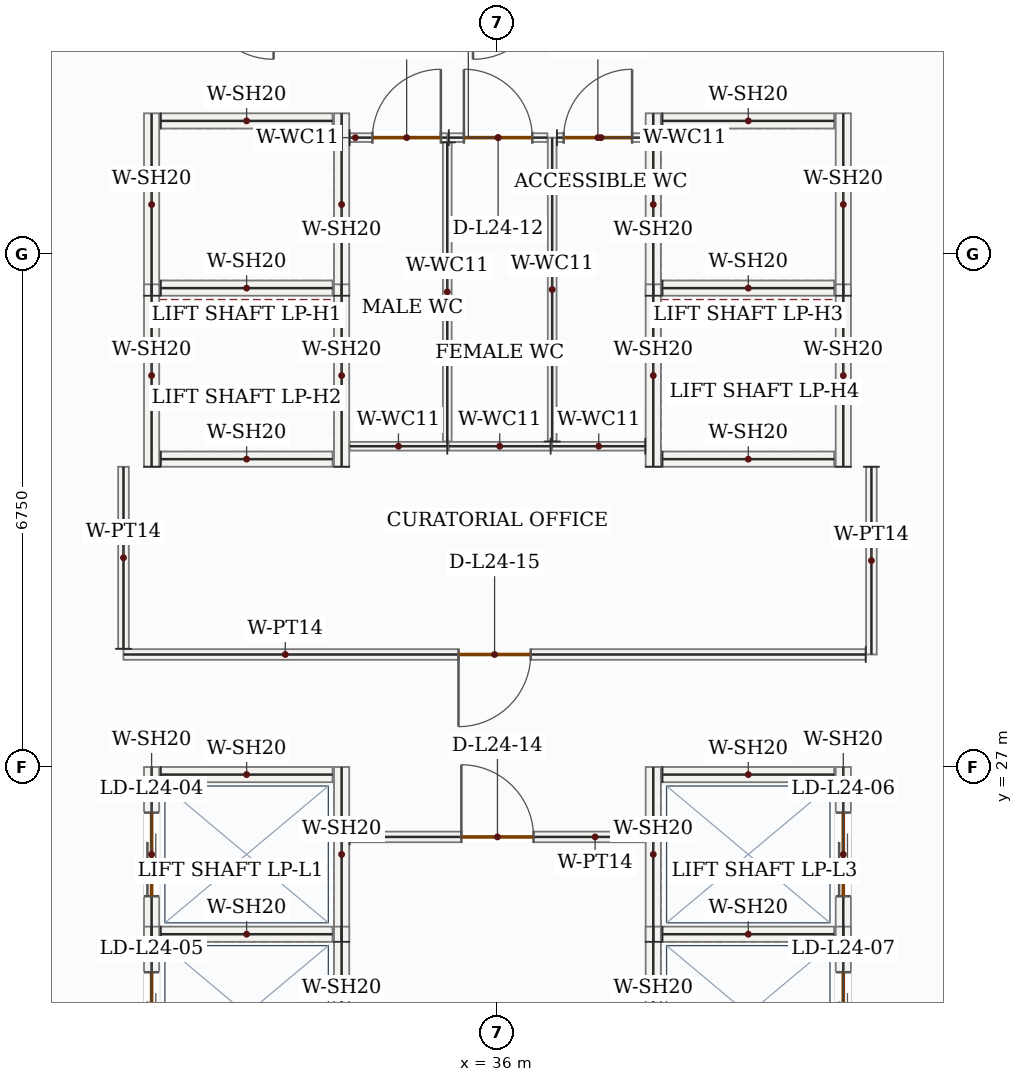
"""IFC4 building model, lengths in metres.
Left out: names, types, materials, properties, quantities, classifications, styles, units other than length and angle.
Written with IfcOpenShell. Run it as: python <this file> out.ifc"""

import sys

from ifc_helpers import new_model, si_unit, direction, frame, frame_2d, origin, place, context, subcontext, project, spatial, rectangle, extrude, source, transform, mapped, element, fill, save


model = new_model("IFC4")
c1 = context("Model", 3, precision=1e-05, world=origin(), true_north=direction((0.0, 1.0)))
c2 = subcontext(c1, "Body", "Model", "MODEL_VIEW")
j1 = project(units=[si_unit("LENGTHUNIT", "METRE"), si_unit("PLANEANGLEUNIT", "RADIAN")], contexts=[c1])
p1 = place(None, origin())
s1 = spatial("IfcSite", under=j1, at=p1, CompositionType="ELEMENT")
p2 = place(p1, origin())
s2 = spatial("IfcBuilding", under=s1, at=p2, CompositionType="ELEMENT")
p3 = place(p2, frame((0.0, 0.0, 108.9)))
s3 = spatial("IfcBuildingStorey", under=s2, at=p3, CompositionType="ELEMENT", Elevation=108.9)
m1 = source(origin(), c2, "Body", "SweptSolid", [
    extrude(rectangle(XDim=2.4, YDim=0.2, at=frame_2d((1.2, 0.0))), origin(), (0.0, 0.0, 1.0), 3.95),
])
for number, where, z_axis, x_axis in (
    (1, (31.45, 33.2, 0.0), (0.0, 0.0, 1.0), (0.0, 1.0, 0.0)),
    (2, (33.95, 33.2, 0.0), (0.0, 0.0, 1.0), (0.0, 1.0, 0.0)),
):
    element("IfcWall", number, at=place(p3, frame(where, z_axis=z_axis, x_axis=x_axis)), inside=s3, PredefinedType="SOLIDWALL", context=c2, shape_type="MappedRepresentation", body=[
        mapped(m1, transform((0.0, 0.0, 0.0), x_axis=(1.0, 0.0, 0.0), y_axis=(0.0, 1.0, 0.0), z_axis=(0.0, 0.0, 1.0), scale=1.0)),
    ])
m2 = source(origin(), c2, "Body", "SweptSolid", [
    extrude(rectangle(XDim=2.26, YDim=0.2, at=frame_2d((1.13, 0.0))), origin(), (0.0, 0.0, 1.0), 3.95),
])
for number, where, z_axis, x_axis in (
    (3, (31.57, 33.3, 0.0), (0.0, 0.0, 1.0), (1.0, 0.0, 0.0)),
    (4, (31.57, 35.5, 0.0), (0.0, 0.0, 1.0), (1.0, 0.0, 0.0)),
):
    element("IfcWall", number, at=place(p3, frame(where, z_axis=z_axis, x_axis=x_axis)), inside=s3, PredefinedType="SOLIDWALL", context=c2, shape_type="MappedRepresentation", body=[
        mapped(m2, transform((0.0, 0.0, 0.0), x_axis=(1.0, 0.0, 0.0), y_axis=(0.0, 1.0, 0.0), z_axis=(0.0, 0.0, 1.0), scale=1.0)),
    ])
for number, where, z_axis, x_axis in (
    (5, (31.45, 30.95, 0.0), (0.0, 0.0, 1.0), (0.0, 1.0, 0.0)),
    (6, (33.95, 30.95, 0.0), (0.0, 0.0, 1.0), (0.0, 1.0, 0.0)),
):
    element("IfcWall", number, at=place(p3, frame(where, z_axis=z_axis, x_axis=x_axis)), inside=s3, PredefinedType="SOLIDWALL", context=c2, shape_type="MappedRepresentation", body=[
        mapped(m1, transform((0.0, 0.0, 0.0), x_axis=(1.0, 0.0, 0.0), y_axis=(0.0, 1.0, 0.0), z_axis=(0.0, 0.0, 1.0), scale=1.0)),
    ])
p4 = place(p3, frame((31.57, 31.05, 0.0), z_axis=(0.0, 0.0, 1.0), x_axis=(1.0, 0.0, 0.0)))
e7 = element("IfcWall", 7, at=p4, inside=s3, PredefinedType="SOLIDWALL", context=c2, shape_type="MappedRepresentation", body=[
    mapped(m2, transform((0.0, 0.0, 0.0), x_axis=(1.0, 0.0, 0.0), y_axis=(0.0, 1.0, 0.0), z_axis=(0.0, 0.0, 1.0), scale=1.0)),
])
for number, where, z_axis, x_axis in (
    (8, (38.05, 33.2, 0.0), (0.0, 0.0, 1.0), (0.0, 1.0, 0.0)),
    (9, (40.55, 33.2, 0.0), (0.0, 0.0, 1.0), (0.0, 1.0, 0.0)),
):
    element("IfcWall", number, at=place(p3, frame(where, z_axis=z_axis, x_axis=x_axis)), inside=s3, PredefinedType="SOLIDWALL", context=c2, shape_type="MappedRepresentation", body=[
        mapped(m1, transform((0.0, 0.0, 0.0), x_axis=(1.0, 0.0, 0.0), y_axis=(0.0, 1.0, 0.0), z_axis=(0.0, 0.0, 1.0), scale=1.0)),
    ])
for number, where, z_axis, x_axis in (
    (10, (38.17, 33.3, 0.0), (0.0, 0.0, 1.0), (1.0, 0.0, 0.0)),
    (11, (38.17, 35.5, 0.0), (0.0, 0.0, 1.0), (1.0, 0.0, 0.0)),
):
    element("IfcWall", number, at=place(p3, frame(where, z_axis=z_axis, x_axis=x_axis)), inside=s3, PredefinedType="SOLIDWALL", context=c2, shape_type="MappedRepresentation", body=[
        mapped(m2, transform((0.0, 0.0, 0.0), x_axis=(1.0, 0.0, 0.0), y_axis=(0.0, 1.0, 0.0), z_axis=(0.0, 0.0, 1.0), scale=1.0)),
    ])
for number, where, z_axis, x_axis in (
    (12, (38.05, 30.95, 0.0), (0.0, 0.0, 1.0), (0.0, 1.0, 0.0)),
    (13, (40.55, 30.95, 0.0), (0.0, 0.0, 1.0), (0.0, 1.0, 0.0)),
):
    element("IfcWall", number, at=place(p3, frame(where, z_axis=z_axis, x_axis=x_axis)), inside=s3, PredefinedType="SOLIDWALL", context=c2, shape_type="MappedRepresentation", body=[
        mapped(m1, transform((0.0, 0.0, 0.0), x_axis=(1.0, 0.0, 0.0), y_axis=(0.0, 1.0, 0.0), z_axis=(0.0, 0.0, 1.0), scale=1.0)),
    ])
p5 = place(p3, frame((38.17, 31.05, 0.0), z_axis=(0.0, 0.0, 1.0), x_axis=(1.0, 0.0, 0.0)))
e14 = element("IfcWall", 14, at=p5, inside=s3, PredefinedType="SOLIDWALL", context=c2, shape_type="MappedRepresentation", body=[
    mapped(m2, transform((0.0, 0.0, 0.0), x_axis=(1.0, 0.0, 0.0), y_axis=(0.0, 1.0, 0.0), z_axis=(0.0, 0.0, 1.0), scale=1.0)),
])
p6 = place(p3, frame((31.45, 24.7, 0.0), z_axis=(0.0, 0.0, 1.0), x_axis=(0.0, 1.0, 0.0)))
e15 = element("IfcWall", 15, at=p6, inside=s3, PredefinedType="SOLIDWALL", context=c2, shape_type="SweptSolid", body=[
    extrude(rectangle(XDim=2.3, YDim=0.2, at=frame_2d((1.15, 0.0))), origin(), (0.0, 0.0, 1.0), 3.95),
])
p7 = place(p6, frame((0.6, 0.0, 0.0)))
e16 = element("IfcOpeningElement", 16, at=p7, cuts=e15, PredefinedType="OPENING", context=c2, shape_type="SweptSolid", body=[
    extrude(rectangle(XDim=1.1, YDim=2.15, at=frame_2d((0.55, 1.075))), frame((0.0, 0.11, 0.0), z_axis=(0.0, -1.0, 0.0), x_axis=(1.0, 0.0, 0.0)), (0.0, 0.0, 1.0), 0.22),
])
m3 = source(origin(), c2, "Body", "SweptSolid", [
    extrude(rectangle(XDim=2.3, YDim=0.2, at=frame_2d((1.15, 0.0))), origin(), (0.0, 0.0, 1.0), 3.95),
])
p8 = place(p3, frame((33.95, 24.7, 0.0), z_axis=(0.0, 0.0, 1.0), x_axis=(0.0, 1.0, 0.0)))
e17 = element("IfcWall", 17, at=p8, inside=s3, PredefinedType="SOLIDWALL", context=c2, shape_type="MappedRepresentation", body=[
    mapped(m3, transform((0.0, 0.0, 0.0), x_axis=(1.0, 0.0, 0.0), y_axis=(0.0, 1.0, 0.0), z_axis=(0.0, 0.0, 1.0), scale=1.0)),
])
for number, where, z_axis, x_axis in (
    (18, (31.57, 24.8, 0.0), (0.0, 0.0, 1.0), (1.0, 0.0, 0.0)),
    (19, (31.57, 26.9, 0.0), (0.0, 0.0, 1.0), (1.0, 0.0, 0.0)),
):
    element("IfcWall", number, at=place(p3, frame(where, z_axis=z_axis, x_axis=x_axis)), inside=s3, PredefinedType="SOLIDWALL", context=c2, shape_type="MappedRepresentation", body=[
        mapped(m2, transform((0.0, 0.0, 0.0), x_axis=(1.0, 0.0, 0.0), y_axis=(0.0, 1.0, 0.0), z_axis=(0.0, 0.0, 1.0), scale=1.0)),
    ])
p9 = place(p3, frame((31.45, 22.6, 0.0), z_axis=(0.0, 0.0, 1.0), x_axis=(0.0, 1.0, 0.0)))
e20 = element("IfcWall", 20, at=p9, inside=s3, PredefinedType="SOLIDWALL", context=c2, shape_type="SweptSolid", body=[
    extrude(rectangle(XDim=2.3, YDim=0.2, at=frame_2d((1.15, 0.0))), origin(), (0.0, 0.0, 1.0), 3.95),
])
p10 = place(p9, frame((0.6, 0.0, 0.0)))
e21 = element("IfcOpeningElement", 21, at=p10, cuts=e20, PredefinedType="OPENING", context=c2, shape_type="SweptSolid", body=[
    extrude(rectangle(XDim=1.1, YDim=2.15, at=frame_2d((0.55, 1.075))), frame((0.0, 0.11, 0.0), z_axis=(0.0, -1.0, 0.0), x_axis=(1.0, 0.0, 0.0)), (0.0, 0.0, 1.0), 0.22),
])
m4 = source(origin(), c2, "Body", "SweptSolid", [
    extrude(rectangle(XDim=2.3, YDim=0.2, at=frame_2d((1.15, 0.0))), origin(), (0.0, 0.0, 1.0), 3.95),
])
p11 = place(p3, frame((33.95, 22.6, 0.0), z_axis=(0.0, 0.0, 1.0), x_axis=(0.0, 1.0, 0.0)))
e22 = element("IfcWall", 22, at=p11, inside=s3, PredefinedType="SOLIDWALL", context=c2, shape_type="MappedRepresentation", body=[
    mapped(m4, transform((0.0, 0.0, 0.0), x_axis=(1.0, 0.0, 0.0), y_axis=(0.0, 1.0, 0.0), z_axis=(0.0, 0.0, 1.0), scale=1.0)),
])
p12 = place(p3, frame((38.05, 24.7, 0.0), z_axis=(0.0, 0.0, 1.0), x_axis=(0.0, 1.0, 0.0)))
e23 = element("IfcWall", 23, at=p12, inside=s3, PredefinedType="SOLIDWALL", context=c2, shape_type="MappedRepresentation", body=[
    mapped(m3, transform((0.0, 0.0, 0.0), x_axis=(1.0, 0.0, 0.0), y_axis=(0.0, 1.0, 0.0), z_axis=(0.0, 0.0, 1.0), scale=1.0)),
])
p13 = place(p3, frame((40.55, 24.7, 0.0), z_axis=(0.0, 0.0, 1.0), x_axis=(0.0, 1.0, 0.0)))
e24 = element("IfcWall", 24, at=p13, inside=s3, PredefinedType="SOLIDWALL", context=c2, shape_type="SweptSolid", body=[
    extrude(rectangle(XDim=2.3, YDim=0.2, at=frame_2d((1.15, 0.0))), origin(), (0.0, 0.0, 1.0), 3.95),
])
p14 = place(p13, frame((0.6, 0.0, 0.0)))
e25 = element("IfcOpeningElement", 25, at=p14, cuts=e24, PredefinedType="OPENING", context=c2, shape_type="SweptSolid", body=[
    extrude(rectangle(XDim=1.1, YDim=2.15, at=frame_2d((0.55, 1.075))), frame((0.0, 0.11, 0.0), z_axis=(0.0, -1.0, 0.0), x_axis=(1.0, 0.0, 0.0)), (0.0, 0.0, 1.0), 0.22),
])
for number, where, z_axis, x_axis in (
    (26, (38.17, 24.8, 0.0), (0.0, 0.0, 1.0), (1.0, 0.0, 0.0)),
    (27, (38.17, 26.9, 0.0), (0.0, 0.0, 1.0), (1.0, 0.0, 0.0)),
):
    element("IfcWall", number, at=place(p3, frame(where, z_axis=z_axis, x_axis=x_axis)), inside=s3, PredefinedType="SOLIDWALL", context=c2, shape_type="MappedRepresentation", body=[
        mapped(m2, transform((0.0, 0.0, 0.0), x_axis=(1.0, 0.0, 0.0), y_axis=(0.0, 1.0, 0.0), z_axis=(0.0, 0.0, 1.0), scale=1.0)),
    ])
p15 = place(p3, frame((38.05, 22.6, 0.0), z_axis=(0.0, 0.0, 1.0), x_axis=(0.0, 1.0, 0.0)))
e28 = element("IfcWall", 28, at=p15, inside=s3, PredefinedType="SOLIDWALL", context=c2, shape_type="MappedRepresentation", body=[
    mapped(m4, transform((0.0, 0.0, 0.0), x_axis=(1.0, 0.0, 0.0), y_axis=(0.0, 1.0, 0.0), z_axis=(0.0, 0.0, 1.0), scale=1.0)),
])
p16 = place(p3, frame((40.55, 22.6, 0.0), z_axis=(0.0, 0.0, 1.0), x_axis=(0.0, 1.0, 0.0)))
e29 = element("IfcWall", 29, at=p16, inside=s3, PredefinedType="SOLIDWALL", context=c2, shape_type="SweptSolid", body=[
    extrude(rectangle(XDim=2.3, YDim=0.2, at=frame_2d((1.15, 0.0))), origin(), (0.0, 0.0, 1.0), 3.95),
])
p17 = place(p16, frame((0.6, 0.0, 0.0)))
e30 = element("IfcOpeningElement", 30, at=p17, cuts=e29, PredefinedType="OPENING", context=c2, shape_type="SweptSolid", body=[
    extrude(rectangle(XDim=1.1, YDim=2.15, at=frame_2d((0.55, 1.075))), frame((0.0, 0.11, 0.0), z_axis=(0.0, -1.0, 0.0), x_axis=(1.0, 0.0, 0.0)), (0.0, 0.0, 1.0), 0.22),
])
m5 = source(origin(), c2, "Body", "SweptSolid", [
    extrude(rectangle(XDim=1.225, YDim=0.115, at=frame_2d((0.613, 0.0))), origin(), (0.0, 0.0, 1.0), 3.95),
])
p18 = place(p3, frame((37.945, 31.22, 0.0), z_axis=(0.0, 0.0, 1.0), x_axis=(-1.0, 0.0, 0.0)))
e31 = element("IfcWall", 31, at=p18, inside=s3, PredefinedType="PARTITIONING", context=c2, shape_type="MappedRepresentation", body=[
    mapped(m5, transform((0.0, 0.0, 0.0), x_axis=(1.0, 0.0, 0.0), y_axis=(0.0, 1.0, 0.0), z_axis=(0.0, 0.0, 1.0), scale=1.0)),
])
m6 = source(origin(), c2, "Body", "SweptSolid", [
    extrude(rectangle(XDim=3.998, YDim=0.115, at=frame_2d((1.999, 0.0))), origin(), (0.0, 0.0, 1.0), 3.95),
])
p19 = place(p3, frame((36.72, 31.282, 0.0), z_axis=(0.0, 0.0, 1.0), x_axis=(0.0, 1.0, 0.0)))
e32 = element("IfcWall", 32, at=p19, inside=s3, PredefinedType="PARTITIONING", context=c2, shape_type="MappedRepresentation", body=[
    mapped(m6, transform((0.0, 0.0, 0.0), x_axis=(1.0, 0.0, 0.0), y_axis=(0.0, 1.0, 0.0), z_axis=(0.0, 0.0, 1.0), scale=1.0)),
])
p20 = place(p3, frame((36.782, 35.28, 0.0), z_axis=(0.0, 0.0, 1.0), x_axis=(1.0, 0.0, 0.0)))
e33 = element("IfcWall", 33, at=p20, inside=s3, PredefinedType="PARTITIONING", context=c2, shape_type="SweptSolid", body=[
    extrude(rectangle(XDim=1.163, YDim=0.115, at=frame_2d((0.581, 0.0))), origin(), (0.0, 0.0, 1.0), 3.95),
])
p21 = place(p20, frame((0.089, 0.0, 0.0)))
e34 = element("IfcOpeningElement", 34, at=p21, cuts=e33, PredefinedType="OPENING", context=c2, shape_type="SweptSolid", body=[
    extrude(rectangle(XDim=0.9, YDim=2.1, at=frame_2d((0.45, 1.05))), frame((0.0, 0.067, 0.0), z_axis=(0.0, -1.0, 0.0), x_axis=(1.0, 0.0, 0.0)), (0.0, 0.0, 1.0), 0.135),
])
m7 = source(origin(), c2, "Body", "SweptSolid", [
    extrude(rectangle(XDim=1.285, YDim=0.115, at=frame_2d((0.643, 0.0))), origin(), (0.0, 0.0, 1.0), 3.95),
])
p22 = place(p3, frame((35.34, 31.22, 0.0), z_axis=(0.0, 0.0, 1.0), x_axis=(-1.0, 0.0, 0.0)))
e35 = element("IfcWall", 35, at=p22, inside=s3, PredefinedType="PARTITIONING", context=c2, shape_type="MappedRepresentation", body=[
    mapped(m7, transform((0.0, 0.0, 0.0), x_axis=(1.0, 0.0, 0.0), y_axis=(0.0, 1.0, 0.0), z_axis=(0.0, 0.0, 1.0), scale=1.0)),
])
p23 = place(p3, frame((34.055, 35.28, 0.0), z_axis=(0.0, 0.0, 1.0), x_axis=(1.0, 0.0, 0.0)))
e36 = element("IfcWall", 36, at=p23, inside=s3, PredefinedType="PARTITIONING", context=c2, shape_type="SweptSolid", body=[
    extrude(rectangle(XDim=1.285, YDim=0.115, at=frame_2d((0.643, 0.0))), origin(), (0.0, 0.0, 1.0), 3.95),
])
p24 = place(p23, frame((0.3, 0.0, 0.0)))
e37 = element("IfcOpeningElement", 37, at=p24, cuts=e36, PredefinedType="OPENING", context=c2, shape_type="SweptSolid", body=[
    extrude(rectangle(XDim=0.9, YDim=2.1, at=frame_2d((0.45, 1.05))), frame((0.0, 0.067, 0.0), z_axis=(0.0, -1.0, 0.0), x_axis=(1.0, 0.0, 0.0)), (0.0, 0.0, 1.0), 0.135),
])
m8 = source(origin(), c2, "Body", "SweptSolid", [
    extrude(rectangle(XDim=3.935, YDim=0.115, at=frame_2d((1.968, 0.0))), origin(), (0.0, 0.0, 1.0), 3.95),
])
p25 = place(p3, frame((35.34, 35.218, 0.0), z_axis=(0.0, 0.0, 1.0), x_axis=(0.0, -1.0, 0.0)))
e38 = element("IfcWall", 38, at=p25, inside=s3, PredefinedType="PARTITIONING", context=c2, shape_type="MappedRepresentation", body=[
    mapped(m8, transform((0.0, 0.0, 0.0), x_axis=(1.0, 0.0, 0.0), y_axis=(0.0, 1.0, 0.0), z_axis=(0.0, 0.0, 1.0), scale=1.0)),
])
m9 = source(origin(), c2, "Body", "SweptSolid", [
    extrude(rectangle(XDim=1.34, YDim=0.115, at=frame_2d((0.67, 0.0))), origin(), (0.0, 0.0, 1.0), 3.95),
])
p26 = place(p3, frame((36.7, 31.22, 0.0), z_axis=(0.0, 0.0, 1.0), x_axis=(-1.0, 0.0, 0.0)))
e39 = element("IfcWall", 39, at=p26, inside=s3, PredefinedType="PARTITIONING", context=c2, shape_type="MappedRepresentation", body=[
    mapped(m9, transform((0.0, 0.0, 0.0), x_axis=(1.0, 0.0, 0.0), y_axis=(0.0, 1.0, 0.0), z_axis=(0.0, 0.0, 1.0), scale=1.0)),
])
p27 = place(p3, frame((35.36, 35.28, 0.0), z_axis=(0.0, 0.0, 1.0), x_axis=(1.0, 0.0, 0.0)))
e40 = element("IfcWall", 40, at=p27, inside=s3, PredefinedType="PARTITIONING", context=c2, shape_type="SweptSolid", body=[
    extrude(rectangle(XDim=1.297, YDim=0.115, at=frame_2d((0.649, 0.0))), origin(), (0.0, 0.0, 1.0), 3.95),
])
p28 = place(p27, frame((0.199, 0.0, 0.0)))
e41 = element("IfcOpeningElement", 41, at=p28, cuts=e40, PredefinedType="OPENING", context=c2, shape_type="SweptSolid", body=[
    extrude(rectangle(XDim=0.9, YDim=2.1, at=frame_2d((0.45, 1.05))), frame((0.0, 0.067, 0.0), z_axis=(0.0, -1.0, 0.0), x_axis=(1.0, 0.0, 0.0)), (0.0, 0.0, 1.0), 0.135),
])
p29 = place(p3, frame((34.055, 26.08, 0.0), z_axis=(0.0, 0.0, 1.0), x_axis=(1.0, 0.0, 0.0)))
e42 = element("IfcWall", 42, at=p29, inside=s3, PredefinedType="PARTITIONING", context=c2, shape_type="SweptSolid", body=[
    extrude(rectangle(XDim=3.89, YDim=0.14, at=frame_2d((1.945, 0.0))), origin(), (0.0, 0.0, 1.0), 3.95),
])
p30 = place(p29, frame((1.47, 0.0, 0.0)))
e43 = element("IfcOpeningElement", 43, at=p30, cuts=e42, PredefinedType="OPENING", context=c2, shape_type="SweptSolid", body=[
    extrude(rectangle(XDim=0.95, YDim=2.15, at=frame_2d((0.475, 1.075))), frame((0.0, 0.08, 0.0), z_axis=(0.0, -1.0, 0.0), x_axis=(1.0, 0.0, 0.0)), (0.0, 0.0, 1.0), 0.16),
])
m10 = source(origin(), c2, "Body", "SweptSolid", [
    extrude(rectangle(XDim=2.47, YDim=0.14, at=frame_2d((1.235, 0.0))), origin(), (0.0, 0.0, 1.0), 3.95),
])
p31 = place(p3, frame((40.92, 30.95, 0.0), z_axis=(0.0, 0.0, 1.0), x_axis=(0.0, -1.0, 0.0)))
e44 = element("IfcWall", 44, at=p31, inside=s3, PredefinedType="PARTITIONING", context=c2, shape_type="MappedRepresentation", body=[
    mapped(m10, transform((0.0, 0.0, 0.0), x_axis=(1.0, 0.0, 0.0), y_axis=(0.0, 1.0, 0.0), z_axis=(0.0, 0.0, 1.0), scale=1.0)),
])
p32 = place(p3, frame((40.845, 28.48, 0.0), z_axis=(0.0, 0.0, 1.0), x_axis=(-1.0, 0.0, 0.0)))
e45 = element("IfcWall", 45, at=p32, inside=s3, PredefinedType="PARTITIONING", context=c2, shape_type="SweptSolid", body=[
    extrude(rectangle(XDim=9.765, YDim=0.14, at=frame_2d((4.882, 0.0))), origin(), (0.0, 0.0, 1.0), 3.95),
])
p33 = place(p32, frame((4.407, 0.0, 0.0)))
e46 = element("IfcOpeningElement", 46, at=p33, cuts=e45, PredefinedType="OPENING", context=c2, shape_type="SweptSolid", body=[
    extrude(rectangle(XDim=0.95, YDim=2.15, at=frame_2d((0.475, 1.075))), frame((0.0, 0.08, 0.0), z_axis=(0.0, -1.0, 0.0), x_axis=(1.0, 0.0, 0.0)), (0.0, 0.0, 1.0), 0.16),
])
m11 = source(origin(), c2, "Body", "SweptSolid", [
    extrude(rectangle(XDim=2.395, YDim=0.14, at=frame_2d((1.198, 0.0))), origin(), (0.0, 0.0, 1.0), 3.95),
])
p34 = place(p3, frame((31.08, 28.555, 0.0), z_axis=(0.0, 0.0, 1.0), x_axis=(0.0, 1.0, 0.0)))
e47 = element("IfcWall", 47, at=p34, inside=s3, PredefinedType="PARTITIONING", context=c2, shape_type="MappedRepresentation", body=[
    mapped(m11, transform((0.0, 0.0, 0.0), x_axis=(1.0, 0.0, 0.0), y_axis=(0.0, 1.0, 0.0), z_axis=(0.0, 0.0, 1.0), scale=1.0)),
])
m12 = source(origin(), c2, "Body", "SweptSolid", [
    extrude(rectangle(XDim=1.1, YDim=2.15, at=frame_2d((0.55, 1.075))), frame((0.0, 0.025, 0.0), z_axis=(0.0, -1.0, 0.0), x_axis=(1.0, 0.0, 0.0)), (0.0, 0.0, 1.0), 0.05),
])
p35 = place(p7, origin())
e48 = element("IfcDoor", 48, at=p35, inside=s3, OperationType="DOUBLE_DOOR_SLIDING", PredefinedType="DOOR", context=c2, shape_type="MappedRepresentation", body=[
    mapped(m12, transform((0.0, 0.0, 0.0), x_axis=(1.0, 0.0, 0.0), y_axis=(0.0, 1.0, 0.0), z_axis=(0.0, 0.0, 1.0), scale=1.0)),
])
fill(e16, e48)
p36 = place(p10, origin())
e49 = element("IfcDoor", 49, at=p36, inside=s3, OperationType="DOUBLE_DOOR_SLIDING", PredefinedType="DOOR", context=c2, shape_type="MappedRepresentation", body=[
    mapped(m12, transform((0.0, 0.0, 0.0), x_axis=(1.0, 0.0, 0.0), y_axis=(0.0, 1.0, 0.0), z_axis=(0.0, 0.0, 1.0), scale=1.0)),
])
fill(e21, e49)
p37 = place(p14, origin())
e50 = element("IfcDoor", 50, at=p37, inside=s3, OperationType="DOUBLE_DOOR_SLIDING", PredefinedType="DOOR", context=c2, shape_type="MappedRepresentation", body=[
    mapped(m12, transform((0.0, 0.0, 0.0), x_axis=(1.0, 0.0, 0.0), y_axis=(0.0, 1.0, 0.0), z_axis=(0.0, 0.0, 1.0), scale=1.0)),
])
fill(e25, e50)
p38 = place(p17, origin())
e51 = element("IfcDoor", 51, at=p38, inside=s3, OperationType="DOUBLE_DOOR_SLIDING", PredefinedType="DOOR", context=c2, shape_type="MappedRepresentation", body=[
    mapped(m12, transform((0.0, 0.0, 0.0), x_axis=(1.0, 0.0, 0.0), y_axis=(0.0, 1.0, 0.0), z_axis=(0.0, 0.0, 1.0), scale=1.0)),
])
fill(e30, e51)
m13 = source(origin(), c2, "Body", "SweptSolid", [
    extrude(rectangle(XDim=0.9, YDim=2.1, at=frame_2d((0.45, 1.05))), frame((0.0, 0.025, 0.0), z_axis=(0.0, -1.0, 0.0), x_axis=(1.0, 0.0, 0.0)), (0.0, 0.0, 1.0), 0.05),
])
p39 = place(p24, origin())
e52 = element("IfcDoor", 52, at=p39, inside=s3, OperationType="SINGLE_SWING_RIGHT", PredefinedType="DOOR", context=c2, shape_type="MappedRepresentation", body=[
    mapped(m13, transform((0.0, 0.0, 0.0), x_axis=(1.0, 0.0, 0.0), y_axis=(0.0, 1.0, 0.0), z_axis=(0.0, 0.0, 1.0), scale=1.0)),
])
fill(e37, e52)
p40 = place(p28, origin())
e53 = element("IfcDoor", 53, at=p40, inside=s3, OperationType="SINGLE_SWING_LEFT", PredefinedType="DOOR", context=c2, shape_type="MappedRepresentation", body=[
    mapped(m13, transform((0.0, 0.0, 0.0), x_axis=(1.0, 0.0, 0.0), y_axis=(0.0, 1.0, 0.0), z_axis=(0.0, 0.0, 1.0), scale=1.0)),
])
fill(e41, e53)
p41 = place(p21, origin())
e54 = element("IfcDoor", 54, at=p41, inside=s3, OperationType="SINGLE_SWING_RIGHT", PredefinedType="DOOR", context=c2, shape_type="MappedRepresentation", body=[
    mapped(m13, transform((0.0, 0.0, 0.0), x_axis=(1.0, 0.0, 0.0), y_axis=(0.0, 1.0, 0.0), z_axis=(0.0, 0.0, 1.0), scale=1.0)),
])
fill(e34, e54)
m14 = source(origin(), c2, "Body", "SweptSolid", [
    extrude(rectangle(XDim=0.95, YDim=2.15, at=frame_2d((0.475, 1.075))), frame((0.0, 0.025, 0.0), z_axis=(0.0, -1.0, 0.0), x_axis=(1.0, 0.0, 0.0)), (0.0, 0.0, 1.0), 0.05),
])
p42 = place(p30, origin())
e55 = element("IfcDoor", 55, at=p42, inside=s3, OperationType="SINGLE_SWING_LEFT", PredefinedType="DOOR", context=c2, shape_type="MappedRepresentation", body=[
    mapped(m14, transform((0.0, 0.0, 0.0), x_axis=(1.0, 0.0, 0.0), y_axis=(0.0, 1.0, 0.0), z_axis=(0.0, 0.0, 1.0), scale=1.0)),
])
fill(e43, e55)
p43 = place(p33, origin())
e56 = element("IfcDoor", 56, at=p43, inside=s3, OperationType="SINGLE_SWING_RIGHT", PredefinedType="DOOR", context=c2, shape_type="MappedRepresentation", body=[
    mapped(m14, transform((0.0, 0.0, 0.0), x_axis=(1.0, 0.0, 0.0), y_axis=(0.0, 1.0, 0.0), z_axis=(0.0, 0.0, 1.0), scale=1.0)),
])
fill(e46, e56)
save(model, sys.argv[1])
